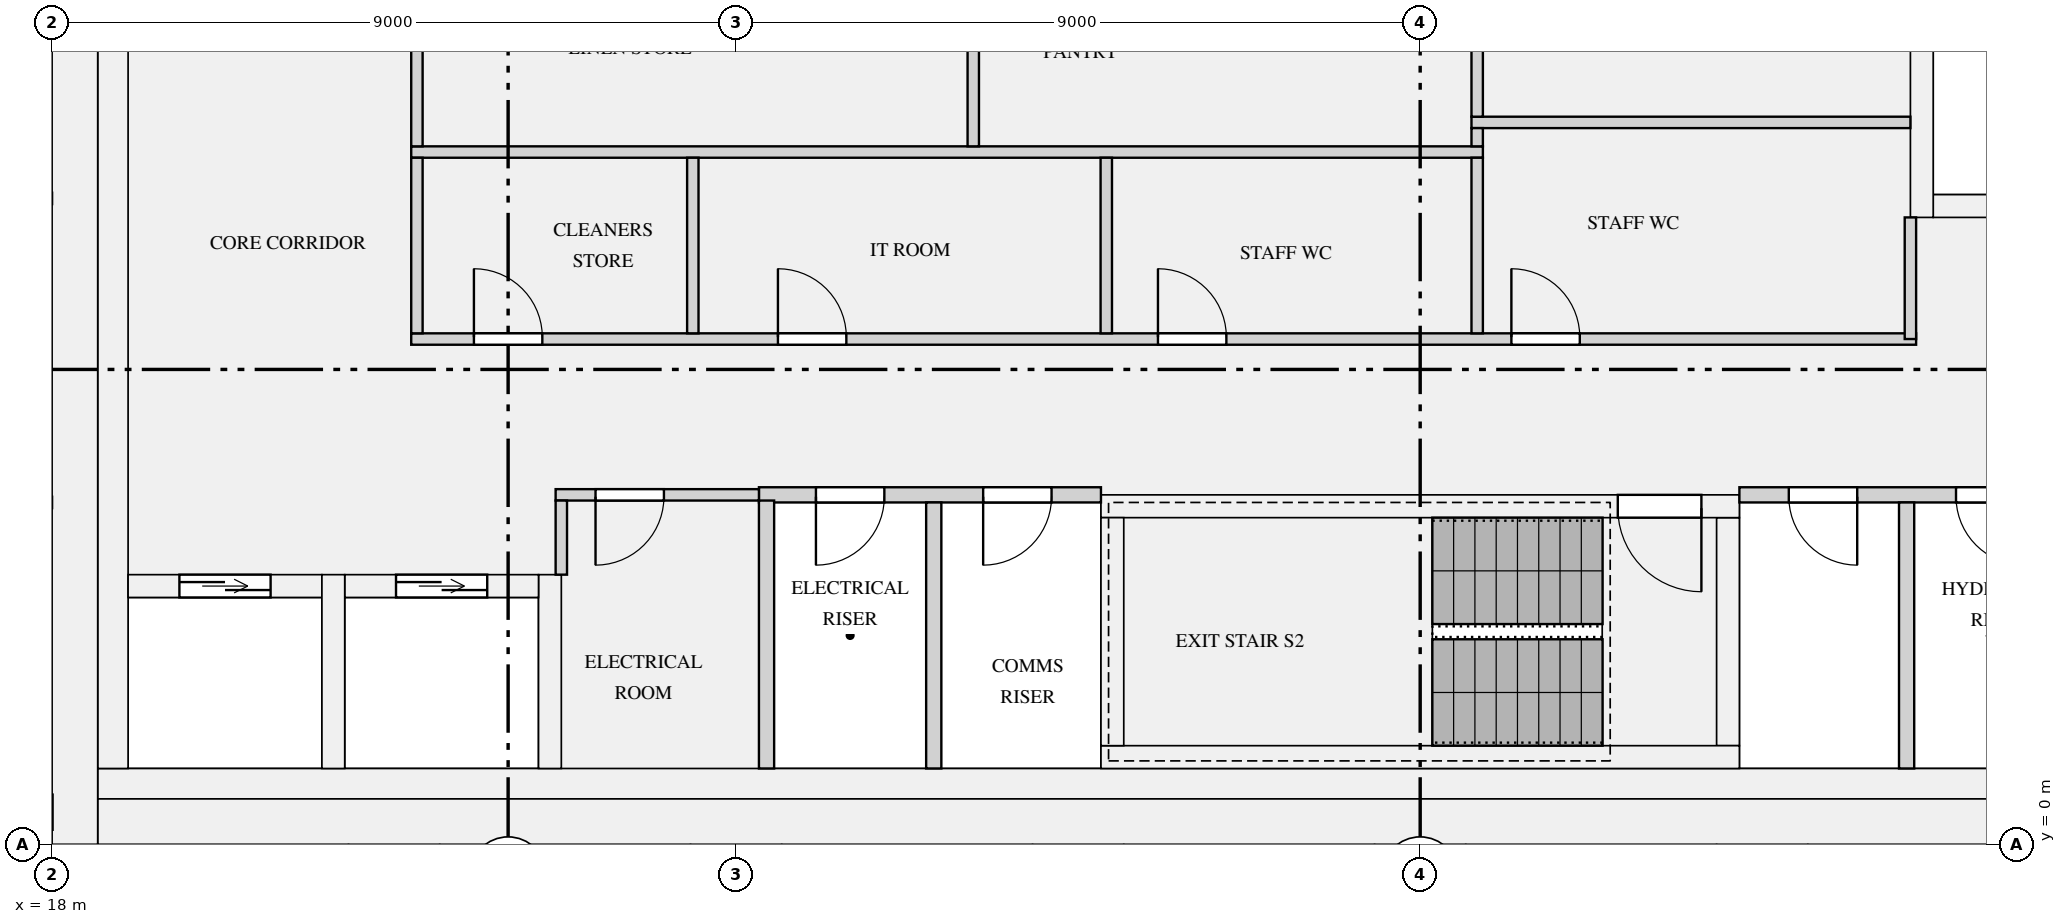
"""IFC4 building model, lengths in metres.
Left out: names, types, materials, properties, quantities, classifications, styles, units other than length and angle.
Written with IfcOpenShell. Run it as: python <this file> out.ifc"""

import sys

from ifc_helpers import new_model, si_unit, direction, frame, frame_2d, origin, place, context, subcontext, project, spatial, rectangle, extrude, element, fill, save


model = new_model("IFC4")
c1 = context("Model", 3, precision=1e-05, world=origin(), true_north=direction((0.0, 1.0)))
c2 = subcontext(c1, "Body", "Model", "MODEL_VIEW")
j1 = project(units=[si_unit("LENGTHUNIT", "METRE"), si_unit("PLANEANGLEUNIT", "RADIAN")], contexts=[c1])
p1 = place(None, origin())
s1 = spatial("IfcSite", under=j1, at=p1, CompositionType="ELEMENT")
p2 = place(p1, origin())
s2 = spatial("IfcBuilding", under=s1, at=p2, CompositionType="ELEMENT")
p3 = place(p2, frame((0.0, 0.0, 207.45)))
s3 = spatial("IfcBuildingStorey", under=s2, at=p3, CompositionType="ELEMENT", Elevation=207.45)
p4 = place(p3, frame((18.3, 0.0, 0.0), z_axis=(0.0, 0.0, 1.0), x_axis=(0.0, 1.0, 0.0)))
e1 = element("IfcWall", 1, at=p4, inside=s3, PredefinedType="SHEAR", context=c2, shape_type="SweptSolid", body=[
    extrude(rectangle(XDim=12.5, YDim=0.6, at=frame_2d((6.25, 0.0))), origin(), (0.0, 0.0, 1.0), 3.15),
])
p5 = place(p3, frame((18.6, 0.3, 0.0), z_axis=(0.0, 0.0, 1.0), x_axis=(1.0, 0.0, 0.0)))
e2 = element("IfcWall", 2, at=p5, inside=s3, PredefinedType="SHEAR", context=c2, shape_type="SweptSolid", body=[
    extrude(rectangle(XDim=34.8, YDim=0.6, at=frame_2d((17.4, 0.0))), origin(), (0.0, 0.0, 1.0), 3.15),
])
p6 = place(p3, frame((18.8, 1.0, 0.0), z_axis=(0.0, 0.0, 1.0), x_axis=(0.0, 1.0, 0.0)))
e3 = element("IfcWall", 3, at=p6, inside=s3, PredefinedType="SHEAR", context=c2, shape_type="SweptSolid", body=[
    extrude(rectangle(XDim=10.9, YDim=0.4, at=frame_2d((5.45, 0.0))), origin(), (0.0, 0.0, 1.0), 3.15),
])
p7 = place(p3, frame((18.6, 0.8, 0.0), z_axis=(0.0, 0.0, 1.0), x_axis=(1.0, 0.0, 0.0)))
e4 = element("IfcWall", 4, at=p7, inside=s3, PredefinedType="SHEAR", context=c2, shape_type="SweptSolid", body=[
    extrude(rectangle(XDim=34.8, YDim=0.4, at=frame_2d((17.4, 0.0))), origin(), (0.0, 0.0, 1.0), 3.15),
])
p8 = place(p3, frame((42.75, 8.4, 0.0), z_axis=(0.0, 0.0, 1.0), x_axis=(1.0, 0.0, 0.0)))
e5 = element("IfcWall", 5, at=p8, inside=s3, PredefinedType="SHEAR", context=c2, shape_type="SweptSolid", body=[
    extrude(rectangle(XDim=1.95, YDim=0.3, at=frame_2d((0.975, 0.0))), origin(), (0.0, 0.0, 1.0), 3.15),
])
p9 = place(p3, frame((42.6, 8.25, 0.0), z_axis=(0.0, 0.0, 1.0), x_axis=(0.0, 1.0, 0.0)))
e6 = element("IfcWall", 6, at=p9, inside=s3, PredefinedType="SHEAR", context=c2, shape_type="SweptSolid", body=[
    extrude(rectangle(XDim=3.65, YDim=0.3, at=frame_2d((1.825, 0.0))), origin(), (0.0, 0.0, 1.0), 3.15),
])
p10 = place(p3, frame((19.0, 3.4, 0.0), z_axis=(0.0, 0.0, 1.0), x_axis=(1.0, 0.0, 0.0)))
e7 = element("IfcWall", 7, at=p10, inside=s3, PredefinedType="SHEAR", context=c2, shape_type="SweptSolid", body=[
    extrude(rectangle(XDim=2.55, YDim=0.3, at=frame_2d((1.275, 0.0))), origin(), (0.0, 0.0, 1.0), 3.15),
])
p11 = place(p10, frame((0.675, 0.0, 0.0)))
e8 = element("IfcOpeningElement", 8, at=p11, cuts=e7, PredefinedType="OPENING", context=c2, shape_type="SweptSolid", body=[
    extrude(rectangle(XDim=1.2, YDim=2.1, at=frame_2d((0.6, 1.05))), frame((0.0, 0.16, 0.0), z_axis=(0.0, -1.0, 0.0), x_axis=(1.0, 0.0, 0.0)), (0.0, 0.0, 1.0), 0.32),
])
p12 = place(p3, frame((21.85, 3.4, 0.0), z_axis=(0.0, 0.0, 1.0), x_axis=(1.0, 0.0, 0.0)))
e9 = element("IfcWall", 9, at=p12, inside=s3, PredefinedType="SHEAR", context=c2, shape_type="SweptSolid", body=[
    extrude(rectangle(XDim=2.55, YDim=0.3, at=frame_2d((1.275, 0.0))), origin(), (0.0, 0.0, 1.0), 3.15),
])
p13 = place(p12, frame((0.675, 0.0, 0.0)))
e10 = element("IfcOpeningElement", 10, at=p13, cuts=e9, PredefinedType="OPENING", context=c2, shape_type="SweptSolid", body=[
    extrude(rectangle(XDim=1.2, YDim=2.1, at=frame_2d((0.6, 1.05))), frame((0.0, 0.16, 0.0), z_axis=(0.0, -1.0, 0.0), x_axis=(1.0, 0.0, 0.0)), (0.0, 0.0, 1.0), 0.32),
])
for number, where, z_axis, x_axis in (
    (11, (21.7, 1.0, 0.0), (0.0, 0.0, 1.0), (0.0, 1.0, 0.0)),
    (12, (24.55, 1.0, 0.0), (0.0, 0.0, 1.0), (0.0, 1.0, 0.0)),
):
    element("IfcWall", number, at=place(p3, frame(where, z_axis=z_axis, x_axis=x_axis)), inside=s3, PredefinedType="SHEAR", context=c2, shape_type="SweptSolid", body=[
        extrude(rectangle(XDim=2.55, YDim=0.3, at=frame_2d((1.275, 0.0))), origin(), (0.0, 0.0, 1.0), 3.15),
    ])
p14 = place(p3, frame((31.8, 1.15, 0.0), z_axis=(0.0, 0.0, 1.0), x_axis=(1.0, 0.0, 0.0)))
e13 = element("IfcWall", 13, at=p14, inside=s3, PredefinedType="SHEAR", context=c2, shape_type="SweptSolid", body=[
    extrude(rectangle(XDim=8.4, YDim=0.3, at=frame_2d((4.2, 0.0))), origin(), (0.0, 0.0, 1.0), 3.15),
])
p15 = place(p3, frame((31.8, 4.45, 0.0), z_axis=(0.0, 0.0, 1.0), x_axis=(1.0, 0.0, 0.0)))
e14 = element("IfcWall", 14, at=p15, inside=s3, PredefinedType="SHEAR", context=c2, shape_type="SweptSolid", body=[
    extrude(rectangle(XDim=8.4, YDim=0.3, at=frame_2d((4.2, 0.0))), origin(), (0.0, 0.0, 1.0), 3.15),
])
p16 = place(p15, frame((6.8, 0.0, 0.0)))
e15 = element("IfcOpeningElement", 15, at=p16, cuts=e14, PredefinedType="OPENING", context=c2, shape_type="SweptSolid", body=[
    extrude(rectangle(XDim=1.1, YDim=2.1, at=frame_2d((0.55, 1.05))), frame((0.0, 0.16, 0.0), z_axis=(0.0, -1.0, 0.0), x_axis=(1.0, 0.0, 0.0)), (0.0, 0.0, 1.0), 0.32),
])
for number, where, z_axis, x_axis in (
    (16, (31.95, 1.3, 0.0), (0.0, 0.0, 1.0), (0.0, 1.0, 0.0)),
    (17, (40.05, 1.3, 0.0), (0.0, 0.0, 1.0), (0.0, 1.0, 0.0)),
):
    element("IfcWall", number, at=place(p3, frame(where, z_axis=z_axis, x_axis=x_axis)), inside=s3, PredefinedType="SHEAR", context=c2, shape_type="SweptSolid", body=[
        extrude(rectangle(XDim=3.0, YDim=0.3, at=frame_2d((1.5, 0.0))), origin(), (0.0, 0.0, 1.0), 3.15),
    ])
p17 = place(p3, frame((27.3, 4.6, 0.0), z_axis=(0.0, 0.0, 1.0), x_axis=(1.0, 0.0, 0.0)))
e18 = element("IfcWall", 18, at=p17, inside=s3, PredefinedType="PARTITIONING", context=c2, shape_type="SweptSolid", body=[
    extrude(rectangle(XDim=4.5, YDim=0.2, at=frame_2d((2.25, 0.0))), origin(), (0.0, 0.0, 1.0), 2.83),
])
p18 = place(p17, frame((0.75, 0.0, 0.0)))
e19 = element("IfcOpeningElement", 19, at=p18, cuts=e18, PredefinedType="OPENING", context=c2, shape_type="SweptSolid", body=[
    extrude(rectangle(XDim=0.9, YDim=2.1, at=frame_2d((0.45, 1.05))), frame((0.0, 0.11, 0.0), z_axis=(0.0, -1.0, 0.0), x_axis=(1.0, 0.0, 0.0)), (0.0, 0.0, 1.0), 0.22),
])
p19 = place(p17, frame((2.95, 0.0, 0.0)))
e20 = element("IfcOpeningElement", 20, at=p19, cuts=e18, PredefinedType="OPENING", context=c2, shape_type="SweptSolid", body=[
    extrude(rectangle(XDim=0.9, YDim=2.1, at=frame_2d((0.45, 1.05))), frame((0.0, 0.11, 0.0), z_axis=(0.0, -1.0, 0.0), x_axis=(1.0, 0.0, 0.0)), (0.0, 0.0, 1.0), 0.22),
])
p20 = place(p3, frame((40.2, 4.6, 0.0), z_axis=(0.0, 0.0, 1.0), x_axis=(1.0, 0.0, 0.0)))
e21 = element("IfcWall", 21, at=p20, inside=s3, PredefinedType="PARTITIONING", context=c2, shape_type="SweptSolid", body=[
    extrude(rectangle(XDim=4.5, YDim=0.2, at=frame_2d((2.25, 0.0))), origin(), (0.0, 0.0, 1.0), 2.83),
])
p21 = place(p20, frame((0.65, 0.0, 0.0)))
e22 = element("IfcOpeningElement", 22, at=p21, cuts=e21, PredefinedType="OPENING", context=c2, shape_type="SweptSolid", body=[
    extrude(rectangle(XDim=0.9, YDim=2.1, at=frame_2d((0.45, 1.05))), frame((0.0, 0.11, 0.0), z_axis=(0.0, -1.0, 0.0), x_axis=(1.0, 0.0, 0.0)), (0.0, 0.0, 1.0), 0.22),
])
p22 = place(p20, frame((2.85, 0.0, 0.0)))
e23 = element("IfcOpeningElement", 23, at=p22, cuts=e21, PredefinedType="OPENING", context=c2, shape_type="SweptSolid", body=[
    extrude(rectangle(XDim=0.9, YDim=2.1, at=frame_2d((0.45, 1.05))), frame((0.0, 0.11, 0.0), z_axis=(0.0, -1.0, 0.0), x_axis=(1.0, 0.0, 0.0)), (0.0, 0.0, 1.0), 0.22),
])
p23 = place(p3, frame((24.625, 4.6, 0.0), z_axis=(0.0, 0.0, 1.0), x_axis=(1.0, 0.0, 0.0)))
e24 = element("IfcWall", 24, at=p23, inside=s3, PredefinedType="PARTITIONING", context=c2, shape_type="SweptSolid", body=[
    extrude(rectangle(XDim=2.675, YDim=0.15, at=frame_2d((1.337, 0.0))), origin(), (0.0, 0.0, 1.0), 2.83),
])
p24 = place(p23, frame((0.525, 0.0, 0.0)))
e25 = element("IfcOpeningElement", 25, at=p24, cuts=e24, PredefinedType="OPENING", context=c2, shape_type="SweptSolid", body=[
    extrude(rectangle(XDim=0.9, YDim=2.1, at=frame_2d((0.45, 1.05))), frame((0.0, 0.085, 0.0), z_axis=(0.0, -1.0, 0.0), x_axis=(1.0, 0.0, 0.0)), (0.0, 0.0, 1.0), 0.17),
])
p25 = place(p3, frame((22.725, 6.65, 0.0), z_axis=(0.0, 0.0, 1.0), x_axis=(1.0, 0.0, 0.0)))
e26 = element("IfcWall", 26, at=p25, inside=s3, PredefinedType="PARTITIONING", context=c2, shape_type="SweptSolid", body=[
    extrude(rectangle(XDim=19.8, YDim=0.15, at=frame_2d((9.9, 0.0))), origin(), (0.0, 0.0, 1.0), 2.83),
])
p26 = place(p25, frame((0.825, 0.0, 0.0)))
e27 = element("IfcOpeningElement", 27, at=p26, cuts=e26, PredefinedType="OPENING", context=c2, shape_type="SweptSolid", body=[
    extrude(rectangle(XDim=0.9, YDim=2.1, at=frame_2d((0.45, 1.05))), frame((0.0, 0.085, 0.0), z_axis=(0.0, -1.0, 0.0), x_axis=(1.0, 0.0, 0.0)), (0.0, 0.0, 1.0), 0.17),
])
p27 = place(p25, frame((4.825, 0.0, 0.0)))
e28 = element("IfcOpeningElement", 28, at=p27, cuts=e26, PredefinedType="OPENING", context=c2, shape_type="SweptSolid", body=[
    extrude(rectangle(XDim=0.9, YDim=2.1, at=frame_2d((0.45, 1.05))), frame((0.0, 0.085, 0.0), z_axis=(0.0, -1.0, 0.0), x_axis=(1.0, 0.0, 0.0)), (0.0, 0.0, 1.0), 0.17),
])
p28 = place(p25, frame((9.825, 0.0, 0.0)))
e29 = element("IfcOpeningElement", 29, at=p28, cuts=e26, PredefinedType="OPENING", context=c2, shape_type="SweptSolid", body=[
    extrude(rectangle(XDim=0.9, YDim=2.1, at=frame_2d((0.45, 1.05))), frame((0.0, 0.085, 0.0), z_axis=(0.0, -1.0, 0.0), x_axis=(1.0, 0.0, 0.0)), (0.0, 0.0, 1.0), 0.17),
])
p29 = place(p25, frame((14.475, 0.0, 0.0)))
e30 = element("IfcOpeningElement", 30, at=p29, cuts=e26, PredefinedType="OPENING", context=c2, shape_type="SweptSolid", body=[
    extrude(rectangle(XDim=0.9, YDim=2.1, at=frame_2d((0.45, 1.05))), frame((0.0, 0.085, 0.0), z_axis=(0.0, -1.0, 0.0), x_axis=(1.0, 0.0, 0.0)), (0.0, 0.0, 1.0), 0.17),
])
p30 = place(p3, frame((22.725, 9.11, 0.0), z_axis=(0.0, 0.0, 1.0), x_axis=(1.0, 0.0, 0.0)))
e31 = element("IfcWall", 31, at=p30, inside=s3, PredefinedType="PARTITIONING", context=c2, shape_type="SweptSolid", body=[
    extrude(rectangle(XDim=14.1, YDim=0.15, at=frame_2d((7.05, 0.0))), origin(), (0.0, 0.0, 1.0), 2.83),
])
p31 = place(p3, frame((36.675, 9.5, 0.0), z_axis=(0.0, 0.0, 1.0), x_axis=(1.0, 0.0, 0.0)))
e32 = element("IfcWall", 32, at=p31, inside=s3, PredefinedType="PARTITIONING", context=c2, shape_type="SweptSolid", body=[
    extrude(rectangle(XDim=5.775, YDim=0.15, at=frame_2d((2.887, 0.0))), origin(), (0.0, 0.0, 1.0), 2.83),
])
p32 = place(p3, frame((27.4, 1.0, 0.0), z_axis=(0.0, 0.0, 1.0), x_axis=(0.0, 1.0, 0.0)))
e33 = element("IfcWall", 33, at=p32, inside=s3, PredefinedType="PARTITIONING", context=c2, shape_type="SweptSolid", body=[
    extrude(rectangle(XDim=3.525, YDim=0.2, at=frame_2d((1.762, 0.0))), origin(), (0.0, 0.0, 1.0), 2.83),
])
for number, where, z_axis, x_axis in (
    (34, (29.6, 1.0, 0.0), (0.0, 0.0, 1.0), (0.0, 1.0, 0.0)),
    (35, (42.4, 1.0, 0.0), (0.0, 0.0, 1.0), (0.0, 1.0, 0.0)),
):
    element("IfcWall", number, at=place(p3, frame(where, z_axis=z_axis, x_axis=x_axis)), inside=s3, PredefinedType="PARTITIONING", context=c2, shape_type="SweptSolid", body=[
        extrude(rectangle(XDim=3.5, YDim=0.2, at=frame_2d((1.75, 0.0))), origin(), (0.0, 0.0, 1.0), 2.83),
    ])
p33 = place(p3, frame((24.7, 3.55, 0.0), z_axis=(0.0, 0.0, 1.0), x_axis=(0.0, 1.0, 0.0)))
e36 = element("IfcWall", 36, at=p33, inside=s3, PredefinedType="PARTITIONING", context=c2, shape_type="SweptSolid", body=[
    extrude(rectangle(XDim=0.975, YDim=0.15, at=frame_2d((0.487, 0.0))), origin(), (0.0, 0.0, 1.0), 2.83),
])
p34 = place(p3, frame((42.45, 6.65, 0.0), z_axis=(0.0, 0.0, 1.0), x_axis=(0.0, 1.0, 0.0)))
e37 = element("IfcWall", 37, at=p34, inside=s3, PredefinedType="PARTITIONING", context=c2, shape_type="SweptSolid", body=[
    extrude(rectangle(XDim=1.6, YDim=0.15, at=frame_2d((0.8, 0.0))), origin(), (0.0, 0.0, 1.0), 2.83),
])
for number, where, z_axis, x_axis in (
    (38, (22.8, 6.725, 0.0), (0.0, 0.0, 1.0), (0.0, 1.0, 0.0)),
    (39, (26.43, 6.725, 0.0), (0.0, 0.0, 1.0), (0.0, 1.0, 0.0)),
    (40, (31.87, 6.725, 0.0), (0.0, 0.0, 1.0), (0.0, 1.0, 0.0)),
    (41, (36.75, 6.725, 0.0), (0.0, 0.0, 1.0), (0.0, 1.0, 0.0)),
):
    element("IfcWall", number, at=place(p3, frame(where, z_axis=z_axis, x_axis=x_axis)), inside=s3, PredefinedType="PARTITIONING", context=c2, shape_type="SweptSolid", body=[
        extrude(rectangle(XDim=2.31, YDim=0.15, at=frame_2d((1.155, 0.0))), origin(), (0.0, 0.0, 1.0), 2.83),
    ])
for number, where, z_axis, x_axis in (
    (42, (22.8, 9.185, 0.0), (0.0, 0.0, 1.0), (0.0, 1.0, 0.0)),
    (43, (30.12, 9.185, 0.0), (0.0, 0.0, 1.0), (0.0, 1.0, 0.0)),
):
    element("IfcWall", number, at=place(p3, frame(where, z_axis=z_axis, x_axis=x_axis)), inside=s3, PredefinedType="PARTITIONING", context=c2, shape_type="SweptSolid", body=[
        extrude(rectangle(XDim=2.715, YDim=0.15, at=frame_2d((1.357, 0.0))), origin(), (0.0, 0.0, 1.0), 2.83),
    ])
p35 = place(p3, frame((36.75, 9.185, 0.0), z_axis=(0.0, 0.0, 1.0), x_axis=(0.0, 1.0, 0.0)))
e44 = element("IfcWall", 44, at=p35, inside=s3, PredefinedType="PARTITIONING", context=c2, shape_type="SweptSolid", body=[
    extrude(rectangle(XDim=0.24, YDim=0.15, at=frame_2d((0.12, 0.0))), origin(), (0.0, 0.0, 1.0), 2.83),
])
p36 = place(p3, frame((36.75, 9.575, 0.0), z_axis=(0.0, 0.0, 1.0), x_axis=(0.0, 1.0, 0.0)))
e45 = element("IfcWall", 45, at=p36, inside=s3, PredefinedType="PARTITIONING", context=c2, shape_type="SweptSolid", body=[
    extrude(rectangle(XDim=2.325, YDim=0.15, at=frame_2d((1.163, 0.0))), origin(), (0.0, 0.0, 1.0), 2.83),
])
p37 = place(p11, origin())
e46 = element("IfcDoor", 46, at=p37, inside=s3, OperationType="DOUBLE_DOOR_SLIDING", PredefinedType="DOOR", context=c2, shape_type="SweptSolid", body=[
    extrude(rectangle(XDim=1.2, YDim=2.1, at=frame_2d((0.6, 1.05))), frame((0.0, 0.025, 0.0), z_axis=(0.0, -1.0, 0.0), x_axis=(1.0, 0.0, 0.0)), (0.0, 0.0, 1.0), 0.05),
])
fill(e8, e46)
p38 = place(p13, origin())
e47 = element("IfcDoor", 47, at=p38, inside=s3, OperationType="DOUBLE_DOOR_SLIDING", PredefinedType="DOOR", context=c2, shape_type="SweptSolid", body=[
    extrude(rectangle(XDim=1.2, YDim=2.1, at=frame_2d((0.6, 1.05))), frame((0.0, 0.025, 0.0), z_axis=(0.0, -1.0, 0.0), x_axis=(1.0, 0.0, 0.0)), (0.0, 0.0, 1.0), 0.05),
])
fill(e10, e47)
p39 = place(p16, frame((1.1, 0.0, 0.0), z_axis=(0.0, 0.0, 1.0), x_axis=(-1.0, 0.0, 0.0)))
e48 = element("IfcDoor", 48, at=p39, inside=s3, OperationType="SINGLE_SWING_LEFT", PredefinedType="DOOR", context=c2, shape_type="SweptSolid", body=[
    extrude(rectangle(XDim=1.1, YDim=2.1, at=frame_2d((0.55, 1.05))), frame((0.0, 0.025, 0.0), z_axis=(0.0, -1.0, 0.0), x_axis=(1.0, 0.0, 0.0)), (0.0, 0.0, 1.0), 0.05),
])
fill(e15, e48)
p40 = place(p24, frame((0.9, 0.0, 0.0), z_axis=(0.0, 0.0, 1.0), x_axis=(-1.0, 0.0, 0.0)))
e49 = element("IfcDoor", 49, at=p40, inside=s3, OperationType="SINGLE_SWING_RIGHT", PredefinedType="DOOR", context=c2, shape_type="SweptSolid", body=[
    extrude(rectangle(XDim=0.9, YDim=2.1, at=frame_2d((0.45, 1.05))), frame((0.0, 0.025, 0.0), z_axis=(0.0, -1.0, 0.0), x_axis=(1.0, 0.0, 0.0)), (0.0, 0.0, 1.0), 0.05),
])
fill(e25, e49)
p41 = place(p26, origin())
e50 = element("IfcDoor", 50, at=p41, inside=s3, OperationType="SINGLE_SWING_LEFT", PredefinedType="DOOR", context=c2, shape_type="SweptSolid", body=[
    extrude(rectangle(XDim=0.9, YDim=2.1, at=frame_2d((0.45, 1.05))), frame((0.0, 0.025, 0.0), z_axis=(0.0, -1.0, 0.0), x_axis=(1.0, 0.0, 0.0)), (0.0, 0.0, 1.0), 0.05),
])
fill(e27, e50)
p42 = place(p27, origin())
e51 = element("IfcDoor", 51, at=p42, inside=s3, OperationType="SINGLE_SWING_LEFT", PredefinedType="DOOR", context=c2, shape_type="SweptSolid", body=[
    extrude(rectangle(XDim=0.9, YDim=2.1, at=frame_2d((0.45, 1.05))), frame((0.0, 0.025, 0.0), z_axis=(0.0, -1.0, 0.0), x_axis=(1.0, 0.0, 0.0)), (0.0, 0.0, 1.0), 0.05),
])
fill(e28, e51)
p43 = place(p28, origin())
e52 = element("IfcDoor", 52, at=p43, inside=s3, OperationType="SINGLE_SWING_LEFT", PredefinedType="DOOR", context=c2, shape_type="SweptSolid", body=[
    extrude(rectangle(XDim=0.9, YDim=2.1, at=frame_2d((0.45, 1.05))), frame((0.0, 0.025, 0.0), z_axis=(0.0, -1.0, 0.0), x_axis=(1.0, 0.0, 0.0)), (0.0, 0.0, 1.0), 0.05),
])
fill(e29, e52)
p44 = place(p29, origin())
e53 = element("IfcDoor", 53, at=p44, inside=s3, OperationType="SINGLE_SWING_LEFT", PredefinedType="DOOR", context=c2, shape_type="SweptSolid", body=[
    extrude(rectangle(XDim=0.9, YDim=2.1, at=frame_2d((0.45, 1.05))), frame((0.0, 0.025, 0.0), z_axis=(0.0, -1.0, 0.0), x_axis=(1.0, 0.0, 0.0)), (0.0, 0.0, 1.0), 0.05),
])
fill(e30, e53)
p45 = place(p18, frame((0.9, 0.0, 0.0), z_axis=(0.0, 0.0, 1.0), x_axis=(-1.0, 0.0, 0.0)))
e54 = element("IfcDoor", 54, at=p45, inside=s3, OperationType="SINGLE_SWING_RIGHT", PredefinedType="DOOR", context=c2, shape_type="SweptSolid", body=[
    extrude(rectangle(XDim=0.9, YDim=2.1, at=frame_2d((0.45, 1.05))), frame((0.0, 0.025, 0.0), z_axis=(0.0, -1.0, 0.0), x_axis=(1.0, 0.0, 0.0)), (0.0, 0.0, 1.0), 0.05),
])
fill(e19, e54)
p46 = place(p19, frame((0.9, 0.0, 0.0), z_axis=(0.0, 0.0, 1.0), x_axis=(-1.0, 0.0, 0.0)))
e55 = element("IfcDoor", 55, at=p46, inside=s3, OperationType="SINGLE_SWING_RIGHT", PredefinedType="DOOR", context=c2, shape_type="SweptSolid", body=[
    extrude(rectangle(XDim=0.9, YDim=2.1, at=frame_2d((0.45, 1.05))), frame((0.0, 0.025, 0.0), z_axis=(0.0, -1.0, 0.0), x_axis=(1.0, 0.0, 0.0)), (0.0, 0.0, 1.0), 0.05),
])
fill(e20, e55)
p47 = place(p21, frame((0.9, 0.0, 0.0), z_axis=(0.0, 0.0, 1.0), x_axis=(-1.0, 0.0, 0.0)))
e56 = element("IfcDoor", 56, at=p47, inside=s3, OperationType="SINGLE_SWING_LEFT", PredefinedType="DOOR", context=c2, shape_type="SweptSolid", body=[
    extrude(rectangle(XDim=0.9, YDim=2.1, at=frame_2d((0.45, 1.05))), frame((0.0, 0.025, 0.0), z_axis=(0.0, -1.0, 0.0), x_axis=(1.0, 0.0, 0.0)), (0.0, 0.0, 1.0), 0.05),
])
fill(e22, e56)
p48 = place(p22, frame((0.9, 0.0, 0.0), z_axis=(0.0, 0.0, 1.0), x_axis=(-1.0, 0.0, 0.0)))
e57 = element("IfcDoor", 57, at=p48, inside=s3, OperationType="SINGLE_SWING_LEFT", PredefinedType="DOOR", context=c2, shape_type="SweptSolid", body=[
    extrude(rectangle(XDim=0.9, YDim=2.1, at=frame_2d((0.45, 1.05))), frame((0.0, 0.025, 0.0), z_axis=(0.0, -1.0, 0.0), x_axis=(1.0, 0.0, 0.0)), (0.0, 0.0, 1.0), 0.05),
])
fill(e23, e57)
save(model, sys.argv[1])
